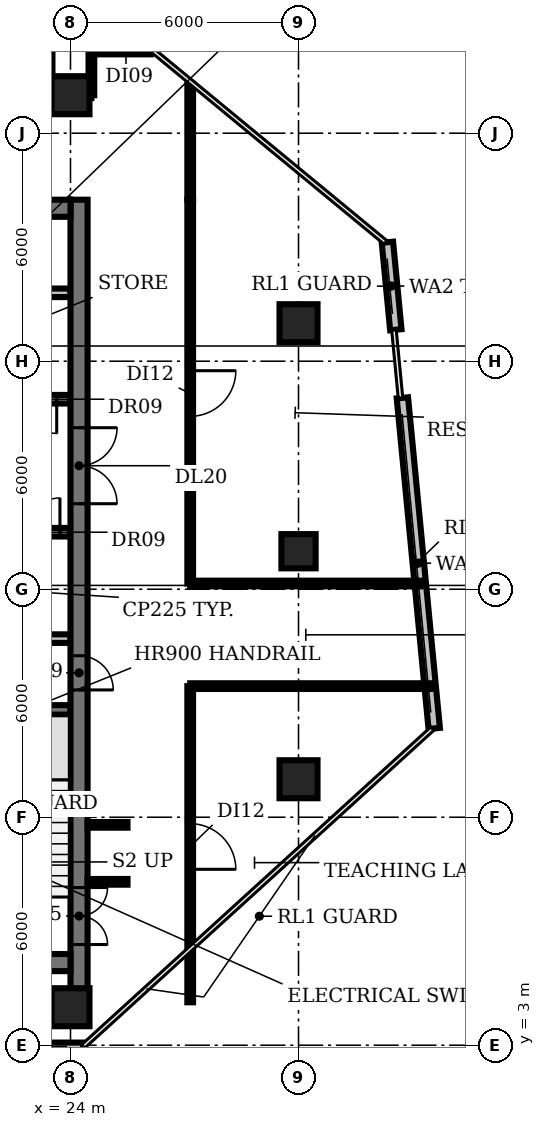
"""IFC4 building model, lengths in metres.
Left out: names, types, materials, properties, quantities, classifications, styles, units other than length and angle.
Written with IfcOpenShell. Run it as: python <this file> out.ifc"""

import sys

from ifc_helpers import new_model, si_unit, direction, frame, frame_2d, origin, origin_2d, place, context, subcontext, project, spatial, rectangle, circle, extrude, element, fill, save


model = new_model("IFC4")
c1 = context("Model", 3, precision=1e-05, world=origin(), true_north=direction((0.0, 1.0)))
c2 = subcontext(c1, "Body", "Model", "MODEL_VIEW")
j1 = project(units=[si_unit("LENGTHUNIT", "METRE"), si_unit("PLANEANGLEUNIT", "RADIAN")], contexts=[c1])
p1 = place(None, origin())
s1 = spatial("IfcSite", under=j1, at=p1, CompositionType="ELEMENT")
p2 = place(p1, origin())
s2 = spatial("IfcBuilding", under=s1, at=p2, CompositionType="ELEMENT")
p3 = place(p2, frame((0.0, 0.0, 205.4)))
s3 = spatial("IfcBuildingStorey", under=s2, at=p3, CompositionType="ELEMENT", Elevation=205.4)
for number, where, z_axis, x_axis in (
    (1, (24.0, 4.0, -0.35), (0.0, 0.0, 1.0), (1.0, 0.0, 0.0)),
    (2, (24.0, 28.0, -0.35), (0.0, 0.0, 1.0), (1.0, 0.0, 0.0)),
    (3, (30.0, 10.0, -0.35), (0.0, 0.0, 1.0), (1.0, 0.0, 0.0)),
):
    element("IfcColumn", number, at=place(p3, frame(where, z_axis=z_axis, x_axis=x_axis)), inside=s3, PredefinedType="COLUMN", context=c2, shape_type="SweptSolid", body=[
        extrude(circle(Radius=0.5, at=origin_2d()), origin(), (0.0, 0.0, 1.0), 4.2),
    ])
p4 = place(p3, frame((30.0, 16.0, -0.35), z_axis=(0.0, 0.0, 1.0), x_axis=(1.0, 0.0, 0.0)))
e4 = element("IfcColumn", 4, at=p4, inside=s3, PredefinedType="COLUMN", context=c2, shape_type="SweptSolid", body=[
    extrude(rectangle(XDim=0.9, YDim=0.9, at=origin_2d()), origin(), (0.0, 0.0, 1.0), 4.2),
])
p5 = place(p3, frame((30.0, 22.0, -0.35), z_axis=(0.0, 0.0, 1.0), x_axis=(1.0, 0.0, 0.0)))
e5 = element("IfcColumn", 5, at=p5, inside=s3, PredefinedType="COLUMN", context=c2, shape_type="SweptSolid", body=[
    extrude(circle(Radius=0.5, at=origin_2d()), origin(), (0.0, 0.0, 1.0), 4.2),
])
p6 = place(p3, frame((15.854, 2.92, 0.0), z_axis=(0.0, 0.0, 1.0), x_axis=(1.0, 0.0, 0.0)))
e6 = element("IfcWall", 6, at=p6, inside=s3, PredefinedType="SOLIDWALL", context=c2, shape_type="SweptSolid", body=[
    extrude(rectangle(XDim=8.48, YDim=0.3, at=frame_2d((4.24, 0.0))), origin(), (0.0, 0.0, 1.0), 3.85),
])
p7 = place(p3, frame((33.571, 11.336, 0.0), z_axis=(0.0, 0.0, 1.0), x_axis=(-0.095841215008, 0.995396635269, 0.0)))
e7 = element("IfcWall", 7, at=p7, inside=s3, PredefinedType="SOLIDWALL", context=c2, shape_type="SweptSolid", body=[
    extrude(rectangle(XDim=8.74, YDim=0.3, at=frame_2d((4.37, 0.0))), origin(), (0.0, 0.0, 1.0), 3.85),
])
p8 = place(p3, frame((32.561, 21.828, 0.0), z_axis=(0.0, 0.0, 1.0), x_axis=(-0.095825017052, 0.995398194748, 0.0)))
e8 = element("IfcWall", 8, at=p8, inside=s3, PredefinedType="SOLIDWALL", context=c2, shape_type="SweptSolid", body=[
    extrude(rectangle(XDim=2.313, YDim=0.3, at=frame_2d((1.157, 0.0))), origin(), (0.0, 0.0, 1.0), 3.85),
])
p9 = place(p3, frame((20.85, 11.825, 0.0), z_axis=(0.0, 0.0, 1.0), x_axis=(1.0, 0.0, 0.0)))
e9 = element("IfcWall", 9, at=p9, inside=s3, PredefinedType="SHEAR", context=c2, shape_type="SweptSolid", body=[
    extrude(rectangle(XDim=3.15, YDim=0.25, at=frame_2d((1.575, 0.0))), origin(), (0.0, 0.0, 1.0), 3.85),
])
p10 = place(p3, frame((16.6, 13.7, 0.0), z_axis=(0.0, 0.0, 1.0), x_axis=(1.0, 0.0, 0.0)))
e10 = element("IfcWall", 10, at=p10, inside=s3, PredefinedType="PARTITIONING", context=c2, shape_type="SweptSolid", body=[
    extrude(rectangle(XDim=7.4, YDim=0.225, at=frame_2d((3.7, 0.0))), origin(), (0.0, 0.0, 1.0), 3.85),
])
p11 = place(p3, frame((9.4, 16.5, 0.0), z_axis=(0.0, 0.0, 1.0), x_axis=(1.0, 0.0, 0.0)))
e11 = element("IfcWall", 11, at=p11, inside=s3, PredefinedType="PARTITIONING", context=c2, shape_type="SweptSolid", body=[
    extrude(rectangle(XDim=14.6, YDim=0.225, at=frame_2d((7.3, 0.0))), origin(), (0.0, 0.0, 1.0), 3.85),
])
p12 = place(p11, frame((1.6, 0.0, 0.0)))
e12 = element("IfcOpeningElement", 12, at=p12, cuts=e11, PredefinedType="OPENING", context=c2, shape_type="SweptSolid", body=[
    extrude(rectangle(XDim=1.0, YDim=2.1, at=frame_2d((0.5, 1.05))), frame((0.0, 0.123, 0.0), z_axis=(0.0, -1.0, 0.0), x_axis=(1.0, 0.0, 0.0)), (0.0, 0.0, 1.0), 0.245),
])
p13 = place(p11, frame((5.125, 0.0, 0.0)))
e13 = element("IfcOpeningElement", 13, at=p13, cuts=e11, PredefinedType="OPENING", context=c2, shape_type="SweptSolid", body=[
    extrude(rectangle(XDim=0.9, YDim=2.1, at=frame_2d((0.45, 1.05))), frame((0.0, 0.123, 0.0), z_axis=(0.0, -1.0, 0.0), x_axis=(1.0, 0.0, 0.0)), (0.0, 0.0, 1.0), 0.245),
])
p14 = place(p11, frame((7.675, 0.0, 0.0)))
e14 = element("IfcOpeningElement", 14, at=p14, cuts=e11, PredefinedType="OPENING", context=c2, shape_type="SweptSolid", body=[
    extrude(rectangle(XDim=0.9, YDim=2.1, at=frame_2d((0.45, 1.05))), frame((0.0, 0.123, 0.0), z_axis=(0.0, -1.0, 0.0), x_axis=(1.0, 0.0, 0.0)), (0.0, 0.0, 1.0), 0.245),
])
p15 = place(p11, frame((9.775, 0.0, 0.0)))
e15 = element("IfcOpeningElement", 15, at=p15, cuts=e11, PredefinedType="OPENING", context=c2, shape_type="SweptSolid", body=[
    extrude(rectangle(XDim=0.9, YDim=2.1, at=frame_2d((0.45, 1.05))), frame((0.0, 0.123, 0.0), z_axis=(0.0, -1.0, 0.0), x_axis=(1.0, 0.0, 0.0)), (0.0, 0.0, 1.0), 0.245),
])
p16 = place(p11, frame((11.647, 0.0, 0.0)))
e16 = element("IfcOpeningElement", 16, at=p16, cuts=e11, PredefinedType="OPENING", context=c2, shape_type="SweptSolid", body=[
    extrude(rectangle(XDim=0.9, YDim=2.1, at=frame_2d((0.45, 1.05))), frame((0.0, 0.123, 0.0), z_axis=(0.0, -1.0, 0.0), x_axis=(1.0, 0.0, 0.0)), (0.0, 0.0, 1.0), 0.245),
])
p17 = place(p11, frame((13.423, 0.0, 0.0)))
e17 = element("IfcOpeningElement", 17, at=p17, cuts=e11, PredefinedType="OPENING", context=c2, shape_type="SweptSolid", body=[
    extrude(rectangle(XDim=0.9, YDim=2.1, at=frame_2d((0.45, 1.05))), frame((0.0, 0.123, 0.0), z_axis=(0.0, -1.0, 0.0), x_axis=(1.0, 0.0, 0.0)), (0.0, 0.0, 1.0), 0.245),
])
p18 = place(p3, frame((24.0, 20.0, 0.0), z_axis=(0.0, 0.0, 1.0), x_axis=(-1.0, 0.0, 0.0)))
e18 = element("IfcWall", 18, at=p18, inside=s3, PredefinedType="PARTITIONING", context=c2, shape_type="SweptSolid", body=[
    extrude(rectangle(XDim=14.6, YDim=0.225, at=frame_2d((7.3, 0.0))), origin(), (0.0, 0.0, 1.0), 3.85),
])
p19 = place(p18, frame((12.75, 0.0, 0.0)))
e19 = element("IfcOpeningElement", 19, at=p19, cuts=e18, PredefinedType="OPENING", context=c2, shape_type="SweptSolid", body=[
    extrude(rectangle(XDim=1.1, YDim=2.1, at=frame_2d((0.55, 1.05))), frame((0.0, 0.123, 0.0), z_axis=(0.0, -1.0, 0.0), x_axis=(1.0, 0.0, 0.0)), (0.0, 0.0, 1.0), 0.245),
])
p20 = place(p18, frame((9.95, 0.0, 0.0)))
e20 = element("IfcOpeningElement", 20, at=p20, cuts=e18, PredefinedType="OPENING", context=c2, shape_type="SweptSolid", body=[
    extrude(rectangle(XDim=1.1, YDim=2.1, at=frame_2d((0.55, 1.05))), frame((0.0, 0.123, 0.0), z_axis=(0.0, -1.0, 0.0), x_axis=(1.0, 0.0, 0.0)), (0.0, 0.0, 1.0), 0.245),
])
p21 = place(p18, frame((7.15, 0.0, 0.0)))
e21 = element("IfcOpeningElement", 21, at=p21, cuts=e18, PredefinedType="OPENING", context=c2, shape_type="SweptSolid", body=[
    extrude(rectangle(XDim=1.1, YDim=2.1, at=frame_2d((0.55, 1.05))), frame((0.0, 0.123, 0.0), z_axis=(0.0, -1.0, 0.0), x_axis=(1.0, 0.0, 0.0)), (0.0, 0.0, 1.0), 0.245),
])
p22 = place(p18, frame((4.35, 0.0, 0.0)))
e22 = element("IfcOpeningElement", 22, at=p22, cuts=e18, PredefinedType="OPENING", context=c2, shape_type="SweptSolid", body=[
    extrude(rectangle(XDim=1.1, YDim=2.1, at=frame_2d((0.55, 1.05))), frame((0.0, 0.123, 0.0), z_axis=(0.0, -1.0, 0.0), x_axis=(1.0, 0.0, 0.0)), (0.0, 0.0, 1.0), 0.245),
])
p23 = place(p18, frame((2.137, 0.0, 0.0)))
e23 = element("IfcOpeningElement", 23, at=p23, cuts=e18, PredefinedType="OPENING", context=c2, shape_type="SweptSolid", body=[
    extrude(rectangle(XDim=0.9, YDim=2.1, at=frame_2d((0.45, 1.05))), frame((0.0, 0.123, 0.0), z_axis=(0.0, -1.0, 0.0), x_axis=(1.0, 0.0, 0.0)), (0.0, 0.0, 1.0), 0.245),
])
p24 = place(p18, frame((0.363, 0.0, 0.0)))
e24 = element("IfcOpeningElement", 24, at=p24, cuts=e18, PredefinedType="OPENING", context=c2, shape_type="SweptSolid", body=[
    extrude(rectangle(XDim=0.9, YDim=2.1, at=frame_2d((0.45, 1.05))), frame((0.0, 0.123, 0.0), z_axis=(0.0, -1.0, 0.0), x_axis=(1.0, 0.0, 0.0)), (0.0, 0.0, 1.0), 0.245),
])
p25 = place(p3, frame((9.4, 22.8, 0.0), z_axis=(0.0, 0.0, 1.0), x_axis=(1.0, 0.0, 0.0)))
e25 = element("IfcWall", 25, at=p25, inside=s3, PredefinedType="PARTITIONING", context=c2, shape_type="SweptSolid", body=[
    extrude(rectangle(XDim=14.6, YDim=0.225, at=frame_2d((7.3, 0.0))), origin(), (0.0, 0.0, 1.0), 3.85),
])
p26 = place(p3, frame((24.225, 25.25, 0.0), z_axis=(0.0, 0.0, 1.0), x_axis=(0.0, -1.0, 0.0)))
e26 = element("IfcWall", 26, at=p26, inside=s3, PredefinedType="SHEAR", context=c2, shape_type="SweptSolid", body=[
    extrude(rectangle(XDim=20.78, YDim=0.45, at=frame_2d((10.39, 0.0))), origin(), (0.0, 0.0, 1.0), 3.85),
])
p27 = place(p26, frame((18.1, 0.0, 0.0)))
e27 = element("IfcOpeningElement", 27, at=p27, cuts=e26, PredefinedType="OPENING", context=c2, shape_type="SweptSolid", body=[
    extrude(rectangle(XDim=1.5, YDim=2.1, at=frame_2d((0.75, 1.05))), frame((0.0, 0.235, 0.0), z_axis=(0.0, -1.0, 0.0), x_axis=(1.0, 0.0, 0.0)), (0.0, 0.0, 1.0), 0.47),
])
p28 = place(p26, frame((12.0, 0.0, 0.0)))
e28 = element("IfcOpeningElement", 28, at=p28, cuts=e26, PredefinedType="OPENING", context=c2, shape_type="SweptSolid", body=[
    extrude(rectangle(XDim=0.9, YDim=2.1, at=frame_2d((0.45, 1.05))), frame((0.0, 0.235, 0.0), z_axis=(0.0, -1.0, 0.0), x_axis=(1.0, 0.0, 0.0)), (0.0, 0.0, 1.0), 0.47),
])
p29 = place(p26, frame((6.0, 0.0, 0.0)))
e29 = element("IfcOpeningElement", 29, at=p29, cuts=e26, PredefinedType="OPENING", context=c2, shape_type="SweptSolid", body=[
    extrude(rectangle(XDim=2.0, YDim=2.1, at=frame_2d((1.0, 1.05))), frame((0.0, 0.235, 0.0), z_axis=(0.0, -1.0, 0.0), x_axis=(1.0, 0.0, 0.0)), (0.0, 0.0, 1.0), 0.47),
])
p30 = place(p3, frame((24.0, 5.175, 0.0), z_axis=(0.0, 0.0, 1.0), x_axis=(-1.0, 0.0, 0.0)))
e30 = element("IfcWall", 30, at=p30, inside=s3, PredefinedType="SHEAR", context=c2, shape_type="SweptSolid", body=[
    extrude(rectangle(XDim=18.0, YDim=0.45, at=frame_2d((9.0, 0.0))), origin(), (0.0, 0.0, 1.0), 3.85),
])
p31 = place(p30, frame((0.825, 0.0, 0.0)))
e31 = element("IfcOpeningElement", 31, at=p31, cuts=e30, PredefinedType="OPENING", context=c2, shape_type="SweptSolid", body=[
    extrude(rectangle(XDim=1.5, YDim=2.1, at=frame_2d((0.75, 1.05))), frame((0.0, 0.235, 0.0), z_axis=(0.0, -1.0, 0.0), x_axis=(1.0, 0.0, 0.0)), (0.0, 0.0, 1.0), 0.47),
])
p32 = place(p30, frame((15.675, 0.0, 0.0)))
e32 = element("IfcOpeningElement", 32, at=p32, cuts=e30, PredefinedType="OPENING", context=c2, shape_type="SweptSolid", body=[
    extrude(rectangle(XDim=1.5, YDim=2.1, at=frame_2d((0.75, 1.05))), frame((0.0, 0.235, 0.0), z_axis=(0.0, -1.0, 0.0), x_axis=(1.0, 0.0, 0.0)), (0.0, 0.0, 1.0), 0.47),
])
p33 = place(p30, frame((13.0, 0.0, 0.0)))
e33 = element("IfcOpeningElement", 33, at=p33, cuts=e30, PredefinedType="OPENING", context=c2, shape_type="SweptSolid", body=[
    extrude(rectangle(XDim=1.2, YDim=2.1, at=frame_2d((0.6, 1.05))), frame((0.0, 0.235, 0.0), z_axis=(0.0, -1.0, 0.0), x_axis=(1.0, 0.0, 0.0)), (0.0, 0.0, 1.0), 0.47),
])
p34 = place(p30, frame((4.35, 0.0, 0.0)))
e34 = element("IfcOpeningElement", 34, at=p34, cuts=e30, PredefinedType="OPENING", context=c2, shape_type="SweptSolid", body=[
    extrude(rectangle(XDim=1.0, YDim=2.1, at=frame_2d((0.5, 1.05))), frame((0.0, 0.235, 0.0), z_axis=(0.0, -1.0, 0.0), x_axis=(1.0, 0.0, 0.0)), (0.0, 0.0, 1.0), 0.47),
])
p35 = place(p3, frame((6.0, 25.025, 0.0), z_axis=(0.0, 0.0, 1.0), x_axis=(1.0, 0.0, 0.0)))
e35 = element("IfcWall", 35, at=p35, inside=s3, PredefinedType="SHEAR", context=c2, shape_type="SweptSolid", body=[
    extrude(rectangle(XDim=18.0, YDim=0.45, at=frame_2d((9.0, 0.0))), origin(), (0.0, 0.0, 1.0), 3.85),
])
p36 = place(p3, frame((23.45, 28.0, 0.0), z_axis=(0.0, 0.0, 1.0), x_axis=(1.0, 0.0, 0.0)))
e36 = element("IfcWall", 36, at=p36, inside=s3, PredefinedType="PARTITIONING", context=c2, shape_type="SweptSolid", body=[
    extrude(rectangle(XDim=1.1, YDim=0.15, at=frame_2d((0.55, 0.0))), origin(), (0.0, 0.0, 1.0), 2.88),
])
for number, where, z_axis, x_axis in (
    (37, (24.45, 7.3, 0.0), (0.0, 0.0, 1.0), (1.0, 0.0, 0.0)),
    (38, (24.45, 8.8, 0.0), (0.0, 0.0, 1.0), (1.0, 0.0, 0.0)),
):
    element("IfcWall", number, at=place(p3, frame(where, z_axis=z_axis, x_axis=x_axis)), inside=s3, PredefinedType="PARTITIONING", context=c2, shape_type="SweptSolid", body=[
        extrude(rectangle(XDim=1.05, YDim=0.15, at=frame_2d((0.525, 0.0))), origin(), (0.0, 0.0, 1.0), 2.88),
    ])
p37 = place(p3, frame((24.55, 28.0, 0.0), z_axis=(0.0, 0.0, 1.0), x_axis=(0.0, 1.0, 0.0)))
e39 = element("IfcWall", 39, at=p37, inside=s3, PredefinedType="PARTITIONING", context=c2, shape_type="SweptSolid", body=[
    extrude(rectangle(XDim=1.15, YDim=0.15, at=frame_2d((0.575, 0.0))), origin(), (0.0, 0.0, 1.0), 2.88),
])
p38 = place(p3, frame((24.55, 29.15, 0.0), z_axis=(0.0, 0.0, 1.0), x_axis=(1.0, 0.0, 0.0)))
e40 = element("IfcWall", 40, at=p38, inside=s3, PredefinedType="PARTITIONING", context=c2, shape_type="SweptSolid", body=[
    extrude(rectangle(XDim=1.56, YDim=0.15, at=frame_2d((0.78, 0.0))), origin(), (0.0, 0.0, 1.0), 2.88),
])
p39 = place(p38, frame((0.46, 0.0, 0.0)))
e41 = element("IfcOpeningElement", 41, at=p39, cuts=e40, PredefinedType="OPENING", context=c2, shape_type="SweptSolid", body=[
    extrude(rectangle(XDim=0.9, YDim=2.1, at=frame_2d((0.45, 1.05))), frame((0.0, 0.085, 0.0), z_axis=(0.0, -1.0, 0.0), x_axis=(1.0, 0.0, 0.0)), (0.0, 0.0, 1.0), 0.17),
])
p40 = place(p3, frame((27.15, 12.45, 0.0), z_axis=(0.0, 0.0, 1.0), x_axis=(0.0, -1.0, 0.0)))
e42 = element("IfcWall", 42, at=p40, inside=s3, PredefinedType="PARTITIONING", context=c2, shape_type="SweptSolid", body=[
    extrude(rectangle(XDim=8.32, YDim=0.15, at=frame_2d((4.16, 0.0))), origin(), (0.0, 0.0, 1.0), 2.88),
])
p41 = place(p40, frame((3.62, 0.0, 0.0)))
e43 = element("IfcOpeningElement", 43, at=p41, cuts=e42, PredefinedType="OPENING", context=c2, shape_type="SweptSolid", body=[
    extrude(rectangle(XDim=1.2, YDim=2.1, at=frame_2d((0.6, 1.05))), frame((0.0, 0.085, 0.0), z_axis=(0.0, -1.0, 0.0), x_axis=(1.0, 0.0, 0.0)), (0.0, 0.0, 1.0), 0.17),
])
p42 = place(p3, frame((27.15, 12.45, 0.0), z_axis=(0.0, 0.0, 1.0), x_axis=(1.0, 0.0, 0.0)))
e44 = element("IfcWall", 44, at=p42, inside=s3, PredefinedType="PARTITIONING", context=c2, shape_type="SweptSolid", body=[
    extrude(rectangle(XDim=6.324, YDim=0.15, at=frame_2d((3.162, 0.0))), origin(), (0.0, 0.0, 1.0), 2.88),
])
p43 = place(p3, frame((27.15, 15.15, 0.0), z_axis=(0.0, 0.0, 1.0), x_axis=(1.0, 0.0, 0.0)))
e45 = element("IfcWall", 45, at=p43, inside=s3, PredefinedType="PARTITIONING", context=c2, shape_type="SweptSolid", body=[
    extrude(rectangle(XDim=6.064, YDim=0.15, at=frame_2d((3.032, 0.0))), origin(), (0.0, 0.0, 1.0), 2.88),
])
p44 = place(p3, frame((27.15, 25.25, 0.0), z_axis=(0.0, 0.0, 1.0), x_axis=(0.0, -1.0, 0.0)))
e46 = element("IfcWall", 46, at=p44, inside=s3, PredefinedType="PARTITIONING", context=c2, shape_type="SweptSolid", body=[
    extrude(rectangle(XDim=10.1, YDim=0.15, at=frame_2d((5.05, 0.0))), origin(), (0.0, 0.0, 1.0), 2.88),
])
p45 = place(p44, frame((4.5, 0.0, 0.0)))
e47 = element("IfcOpeningElement", 47, at=p45, cuts=e46, PredefinedType="OPENING", context=c2, shape_type="SweptSolid", body=[
    extrude(rectangle(XDim=1.2, YDim=2.1, at=frame_2d((0.6, 1.05))), frame((0.0, 0.085, 0.0), z_axis=(0.0, -1.0, 0.0), x_axis=(1.0, 0.0, 0.0)), (0.0, 0.0, 1.0), 0.17),
])
p46 = place(p3, frame((27.15, 25.25, 0.0), z_axis=(0.0, 0.0, 1.0), x_axis=(0.0, 1.0, 0.0)))
e48 = element("IfcWall", 48, at=p46, inside=s3, PredefinedType="PARTITIONING", context=c2, shape_type="SweptSolid", body=[
    extrude(rectangle(XDim=3.05, YDim=0.15, at=frame_2d((1.525, 0.0))), origin(), (0.0, 0.0, 1.0), 2.88),
])
p47 = place(p17, origin())
e49 = element("IfcDoor", 49, at=p47, inside=s3, OperationType="SINGLE_SWING_RIGHT", PredefinedType="DOOR", context=c2, shape_type="SweptSolid", body=[
    extrude(rectangle(XDim=0.9, YDim=2.1, at=frame_2d((0.45, 1.05))), frame((0.0, 0.025, 0.0), z_axis=(0.0, -1.0, 0.0), x_axis=(1.0, 0.0, 0.0)), (0.0, 0.0, 1.0), 0.05),
])
fill(e17, e49)
p48 = place(p24, origin())
e50 = element("IfcDoor", 50, at=p48, inside=s3, OperationType="SINGLE_SWING_LEFT", PredefinedType="DOOR", context=c2, shape_type="SweptSolid", body=[
    extrude(rectangle(XDim=0.9, YDim=2.1, at=frame_2d((0.45, 1.05))), frame((0.0, 0.025, 0.0), z_axis=(0.0, -1.0, 0.0), x_axis=(1.0, 0.0, 0.0)), (0.0, 0.0, 1.0), 0.05),
])
fill(e24, e50)
p49 = place(p27, origin())
e51 = element("IfcDoor", 51, at=p49, inside=s3, OperationType="DOUBLE_DOOR_SINGLE_SWING", PredefinedType="DOOR", context=c2, shape_type="SweptSolid", body=[
    extrude(rectangle(XDim=1.5, YDim=2.1, at=frame_2d((0.75, 1.05))), frame((0.0, 0.025, 0.0), z_axis=(0.0, -1.0, 0.0), x_axis=(1.0, 0.0, 0.0)), (0.0, 0.0, 1.0), 0.05),
])
fill(e27, e51)
p50 = place(p28, origin())
e52 = element("IfcDoor", 52, at=p50, inside=s3, OperationType="SINGLE_SWING_RIGHT", PredefinedType="DOOR", context=c2, shape_type="SweptSolid", body=[
    extrude(rectangle(XDim=0.9, YDim=2.1, at=frame_2d((0.45, 1.05))), frame((0.0, 0.025, 0.0), z_axis=(0.0, -1.0, 0.0), x_axis=(1.0, 0.0, 0.0)), (0.0, 0.0, 1.0), 0.05),
])
fill(e28, e52)
p51 = place(p29, origin())
e53 = element("IfcDoor", 53, at=p51, inside=s3, OperationType="DOUBLE_DOOR_SINGLE_SWING", PredefinedType="DOOR", context=c2, shape_type="SweptSolid", body=[
    extrude(rectangle(XDim=2.0, YDim=2.1, at=frame_2d((1.0, 1.05))), frame((0.0, 0.025, 0.0), z_axis=(0.0, -1.0, 0.0), x_axis=(1.0, 0.0, 0.0)), (0.0, 0.0, 1.0), 0.05),
])
fill(e29, e53)
p52 = place(p39, origin())
e54 = element("IfcDoor", 54, at=p52, inside=s3, OperationType="SINGLE_SWING_LEFT", PredefinedType="DOOR", context=c2, shape_type="SweptSolid", body=[
    extrude(rectangle(XDim=0.9, YDim=2.1, at=frame_2d((0.45, 1.05))), frame((0.0, 0.025, 0.0), z_axis=(0.0, -1.0, 0.0), x_axis=(1.0, 0.0, 0.0)), (0.0, 0.0, 1.0), 0.05),
])
fill(e41, e54)
p53 = place(p41, origin())
e55 = element("IfcDoor", 55, at=p53, inside=s3, OperationType="SINGLE_SWING_RIGHT", PredefinedType="DOOR", context=c2, shape_type="SweptSolid", body=[
    extrude(rectangle(XDim=1.2, YDim=2.1, at=frame_2d((0.6, 1.05))), frame((0.0, 0.025, 0.0), z_axis=(0.0, -1.0, 0.0), x_axis=(1.0, 0.0, 0.0)), (0.0, 0.0, 1.0), 0.05),
])
fill(e43, e55)
p54 = place(p45, origin())
e56 = element("IfcDoor", 56, at=p54, inside=s3, OperationType="SINGLE_SWING_LEFT", PredefinedType="DOOR", context=c2, shape_type="SweptSolid", body=[
    extrude(rectangle(XDim=1.2, YDim=2.1, at=frame_2d((0.6, 1.05))), frame((0.0, 0.025, 0.0), z_axis=(0.0, -1.0, 0.0), x_axis=(1.0, 0.0, 0.0)), (0.0, 0.0, 1.0), 0.05),
])
fill(e47, e56)
save(model, sys.argv[1])
